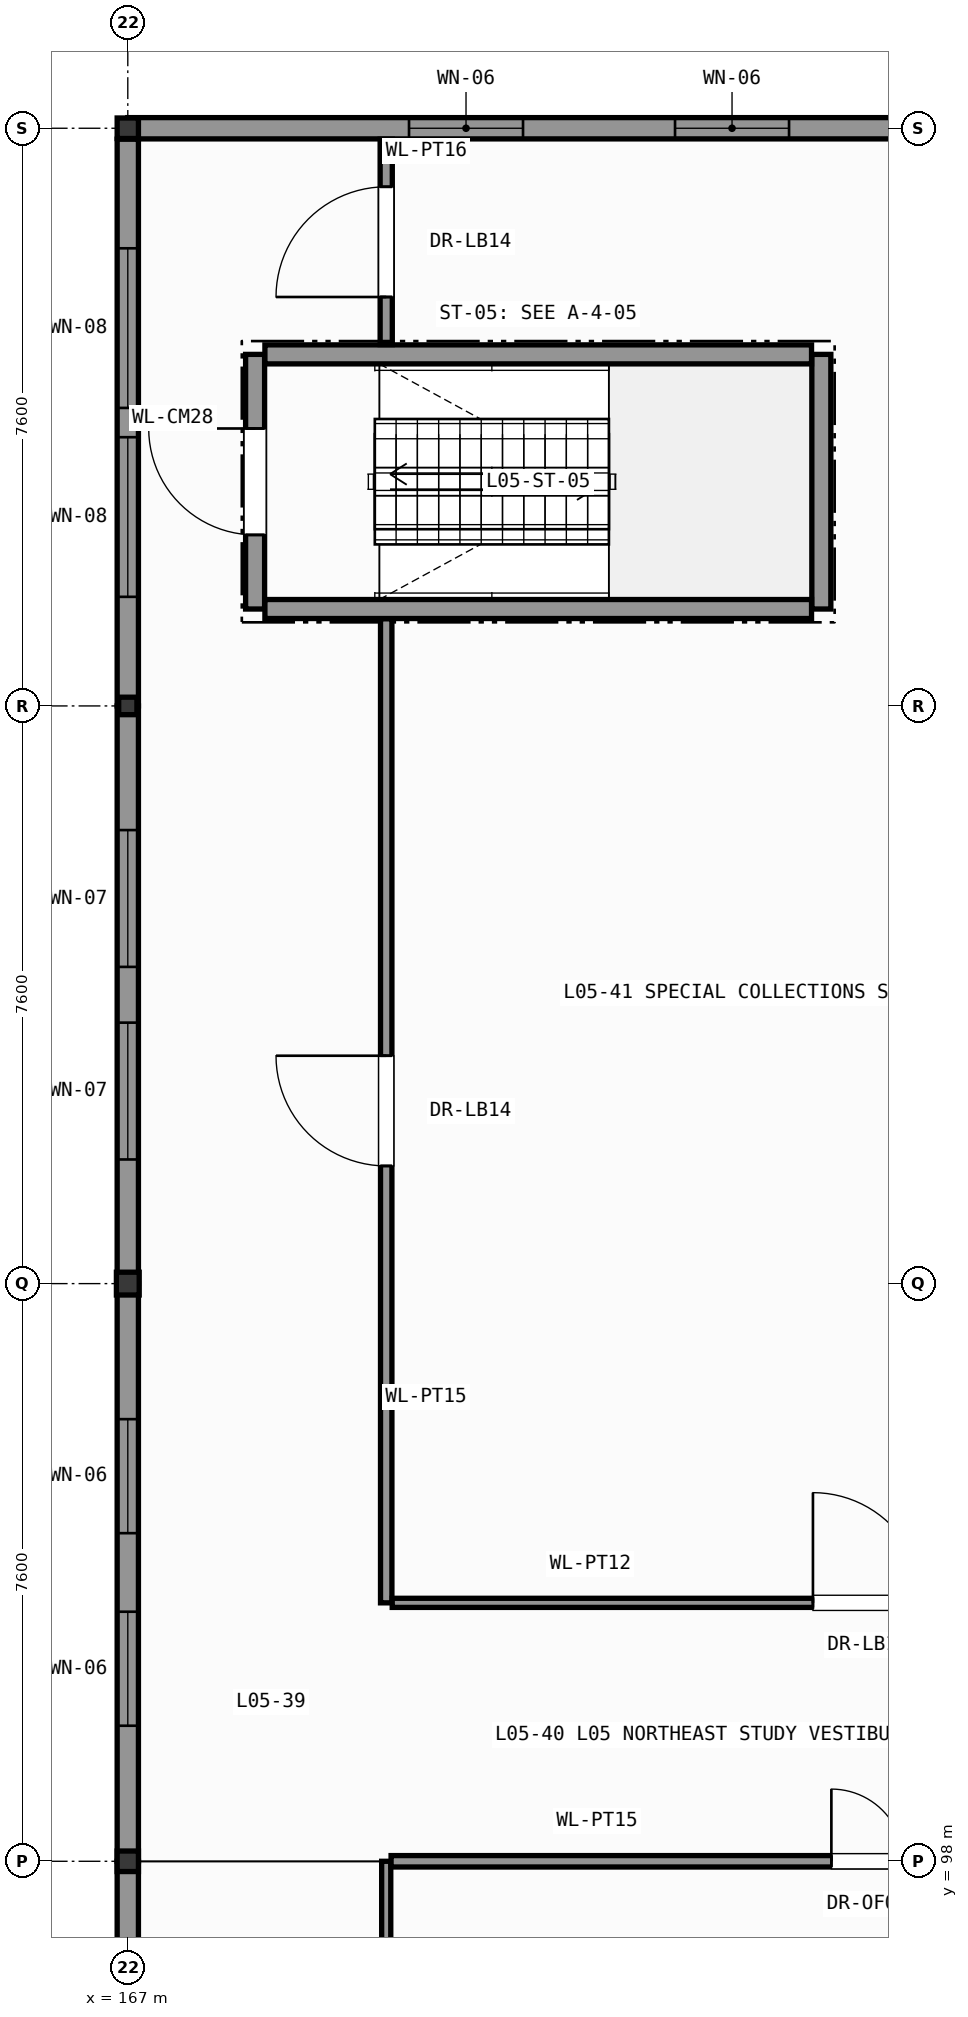
"""IFC4 building model, lengths in metres.
Left out: names, types, materials, properties, quantities, classifications, styles, units other than length and angle.
Written with IfcOpenShell. Run it as: python <this file> out.ifc"""

import sys

from ifc_helpers import new_model, si_unit, direction, frame, frame_2d, origin, origin_2d, place, context, subcontext, project, spatial, rectangle, i_section, extrude, element, fill, save


model = new_model("IFC4")
c1 = context("Model", 3, precision=1e-05, world=origin(), true_north=direction((0.0, 1.0)))
c2 = subcontext(c1, "Body", "Model", "MODEL_VIEW")
j1 = project(units=[si_unit("LENGTHUNIT", "METRE"), si_unit("PLANEANGLEUNIT", "RADIAN")], contexts=[c1])
p1 = place(None, origin())
s1 = spatial("IfcSite", under=j1, at=p1, CompositionType="ELEMENT")
p2 = place(p1, origin())
s2 = spatial("IfcBuilding", under=s1, at=p2, CompositionType="ELEMENT")
p3 = place(p2, frame((0.0, 0.0, 22.2)))
s3 = spatial("IfcBuildingStorey", under=s2, at=p3, CompositionType="ELEMENT", Elevation=22.2)
p4 = place(p3, frame((167.0, 98.0, 0.0), z_axis=(0.0, 0.0, 1.0), x_axis=(1.0, 0.0, 0.0)))
e1 = element("IfcColumn", 1, at=p4, inside=s3, PredefinedType="COLUMN", context=c2, shape_type="SweptSolid", body=[
    extrude(i_section(OverallWidth=0.28, OverallDepth=0.27, WebThickness=0.008, FlangeThickness=0.013, FilletRadius=0.024, at=origin_2d()), origin(), (0.0, 0.0, 1.0), 4.2),
])
p5 = place(p3, frame((167.0, 105.6, 0.0), z_axis=(0.0, 0.0, 1.0), x_axis=(1.0, 0.0, 0.0)))
e2 = element("IfcColumn", 2, at=p5, inside=s3, PredefinedType="COLUMN", context=c2, shape_type="SweptSolid", body=[
    extrude(i_section(OverallWidth=0.3, OverallDepth=0.3, WebThickness=0.011, FlangeThickness=0.019, FilletRadius=0.027, at=origin_2d()), origin(), (0.0, 0.0, 1.0), 4.2),
])
p6 = place(p3, frame((167.0, 113.2, 0.0), z_axis=(0.0, 0.0, 1.0), x_axis=(1.0, 0.0, 0.0)))
e3 = element("IfcColumn", 3, at=p6, inside=s3, PredefinedType="COLUMN", context=c2, shape_type="SweptSolid", body=[
    extrude(i_section(OverallWidth=0.24, OverallDepth=0.23, WebThickness=0.008, FlangeThickness=0.012, FilletRadius=0.021, at=origin_2d()), origin(), (0.0, 0.0, 1.0), 4.2),
])
p7 = place(p3, frame((167.0, 120.8, 0.0), z_axis=(0.0, 0.0, 1.0), x_axis=(1.0, 0.0, 0.0)))
e4 = element("IfcColumn", 4, at=p7, inside=s3, PredefinedType="COLUMN", context=c2, shape_type="SweptSolid", body=[
    extrude(i_section(OverallWidth=0.28, OverallDepth=0.27, WebThickness=0.008, FlangeThickness=0.013, FilletRadius=0.024, at=origin_2d()), origin(), (0.0, 0.0, 1.0), 4.2),
])
p8 = place(p3, frame((167.0, 120.8, 0.0), z_axis=(0.0, 0.0, 1.0), x_axis=(1.0, 0.0, 0.0)))
e5 = element("IfcWall", 5, at=p8, inside=s3, PredefinedType="SOLIDWALL", context=c2, shape_type="SweptSolid", body=[
    extrude(rectangle(XDim=12.0, YDim=0.28, at=frame_2d((6.0, 0.0))), origin(), (0.0, 0.0, 1.0), 3.415),
])
p9 = place(p8, frame((3.7, 0.0, 0.95)))
e6 = element("IfcOpeningElement", 6, at=p9, cuts=e5, PredefinedType="OPENING", context=c2, shape_type="SweptSolid", body=[
    extrude(rectangle(XDim=1.5, YDim=2.06, at=frame_2d((0.75, 1.03))), frame((0.0, 0.15, 0.0), z_axis=(0.0, -1.0, 0.0), x_axis=(1.0, 0.0, 0.0)), (0.0, 0.0, 1.0), 0.3),
])
p10 = place(p8, frame((7.2, 0.0, 0.95)))
e7 = element("IfcOpeningElement", 7, at=p10, cuts=e5, PredefinedType="OPENING", context=c2, shape_type="SweptSolid", body=[
    extrude(rectangle(XDim=1.5, YDim=2.06, at=frame_2d((0.75, 1.03))), frame((0.0, 0.15, 0.0), z_axis=(0.0, -1.0, 0.0), x_axis=(1.0, 0.0, 0.0)), (0.0, 0.0, 1.0), 0.3),
])
p11 = place(p3, frame((167.0, 113.2, 0.0), z_axis=(0.0, 0.0, 1.0), x_axis=(0.0, 1.0, 0.0)))
e8 = element("IfcWall", 8, at=p11, inside=s3, PredefinedType="SOLIDWALL", context=c2, shape_type="SweptSolid", body=[
    extrude(rectangle(XDim=7.456, YDim=0.28, at=frame_2d((3.728, 0.0))), origin(), (0.0, 0.0, 1.0), 3.675),
])
p12 = place(p11, frame((1.435, 0.0, 0.95)))
e9 = element("IfcOpeningElement", 9, at=p12, cuts=e8, PredefinedType="OPENING", context=c2, shape_type="SweptSolid", body=[
    extrude(rectangle(XDim=2.1, YDim=2.33, at=frame_2d((1.05, 1.165))), frame((0.0, 0.15, 0.0), z_axis=(0.0, -1.0, 0.0), x_axis=(1.0, 0.0, 0.0)), (0.0, 0.0, 1.0), 0.3),
])
p13 = place(p11, frame((3.921, 0.0, 0.95)))
e10 = element("IfcOpeningElement", 10, at=p13, cuts=e8, PredefinedType="OPENING", context=c2, shape_type="SweptSolid", body=[
    extrude(rectangle(XDim=2.1, YDim=2.33, at=frame_2d((1.05, 1.165))), frame((0.0, 0.15, 0.0), z_axis=(0.0, -1.0, 0.0), x_axis=(1.0, 0.0, 0.0)), (0.0, 0.0, 1.0), 0.3),
])
p14 = place(p3, frame((167.0, 105.6, 0.0), z_axis=(0.0, 0.0, 1.0), x_axis=(0.0, 1.0, 0.0)))
e11 = element("IfcWall", 11, at=p14, inside=s3, PredefinedType="SOLIDWALL", context=c2, shape_type="SweptSolid", body=[
    extrude(rectangle(XDim=7.6, YDim=0.28, at=frame_2d((3.8, 0.0))), origin(), (0.0, 0.0, 1.0), 3.675),
])
p15 = place(p14, frame((1.633, 0.0, 0.95)))
e12 = element("IfcOpeningElement", 12, at=p15, cuts=e11, PredefinedType="OPENING", context=c2, shape_type="SweptSolid", body=[
    extrude(rectangle(XDim=1.8, YDim=2.33, at=frame_2d((0.9, 1.165))), frame((0.0, 0.15, 0.0), z_axis=(0.0, -1.0, 0.0), x_axis=(1.0, 0.0, 0.0)), (0.0, 0.0, 1.0), 0.3),
])
p16 = place(p14, frame((4.167, 0.0, 0.95)))
e13 = element("IfcOpeningElement", 13, at=p16, cuts=e11, PredefinedType="OPENING", context=c2, shape_type="SweptSolid", body=[
    extrude(rectangle(XDim=1.8, YDim=2.33, at=frame_2d((0.9, 1.165))), frame((0.0, 0.15, 0.0), z_axis=(0.0, -1.0, 0.0), x_axis=(1.0, 0.0, 0.0)), (0.0, 0.0, 1.0), 0.3),
])
p17 = place(p3, frame((167.0, 98.0, 0.0), z_axis=(0.0, 0.0, 1.0), x_axis=(0.0, 1.0, 0.0)))
e14 = element("IfcWall", 14, at=p17, inside=s3, PredefinedType="SOLIDWALL", context=c2, shape_type="SweptSolid", body=[
    extrude(rectangle(XDim=7.6, YDim=0.28, at=frame_2d((3.8, 0.0))), origin(), (0.0, 0.0, 1.0), 3.675),
])
p18 = place(p17, frame((1.783, 0.0, 0.95)))
e15 = element("IfcOpeningElement", 15, at=p18, cuts=e14, PredefinedType="OPENING", context=c2, shape_type="SweptSolid", body=[
    extrude(rectangle(XDim=1.5, YDim=2.33, at=frame_2d((0.75, 1.165))), frame((0.0, 0.15, 0.0), z_axis=(0.0, -1.0, 0.0), x_axis=(1.0, 0.0, 0.0)), (0.0, 0.0, 1.0), 0.3),
])
p19 = place(p17, frame((4.317, 0.0, 0.95)))
e16 = element("IfcOpeningElement", 16, at=p19, cuts=e14, PredefinedType="OPENING", context=c2, shape_type="SweptSolid", body=[
    extrude(rectangle(XDim=1.5, YDim=2.33, at=frame_2d((0.75, 1.165))), frame((0.0, 0.15, 0.0), z_axis=(0.0, -1.0, 0.0), x_axis=(1.0, 0.0, 0.0)), (0.0, 0.0, 1.0), 0.3),
])
p20 = place(p3, frame((167.0, 90.4, 0.0), z_axis=(0.0, 0.0, 1.0), x_axis=(0.0, 1.0, 0.0)))
e17 = element("IfcWall", 17, at=p20, inside=s3, PredefinedType="SOLIDWALL", context=c2, shape_type="SweptSolid", body=[
    extrude(rectangle(XDim=7.6, YDim=0.28, at=frame_2d((3.8, 0.0))), origin(), (0.0, 0.0, 1.0), 3.675),
])
p21 = place(p20, frame((1.483, 0.0, 0.95)))
e18 = element("IfcOpeningElement", 18, at=p21, cuts=e17, PredefinedType="OPENING", context=c2, shape_type="SweptSolid", body=[
    extrude(rectangle(XDim=2.1, YDim=2.33, at=frame_2d((1.05, 1.165))), frame((0.0, 0.15, 0.0), z_axis=(0.0, -1.0, 0.0), x_axis=(1.0, 0.0, 0.0)), (0.0, 0.0, 1.0), 0.3),
])
p22 = place(p20, frame((4.017, 0.0, 0.95)))
e19 = element("IfcOpeningElement", 19, at=p22, cuts=e17, PredefinedType="OPENING", context=c2, shape_type="SweptSolid", body=[
    extrude(rectangle(XDim=2.1, YDim=2.33, at=frame_2d((1.05, 1.165))), frame((0.0, 0.15, 0.0), z_axis=(0.0, -1.0, 0.0), x_axis=(1.0, 0.0, 0.0)), (0.0, 0.0, 1.0), 0.3),
])
p23 = place(p3, frame((168.675, 114.475, 0.0), z_axis=(0.0, 0.0, 1.0), x_axis=(0.0, 1.0, 0.0)))
e20 = element("IfcWall", 20, at=p23, inside=s3, PredefinedType="SHEAR", context=c2, shape_type="SweptSolid", body=[
    extrude(rectangle(XDim=3.35, YDim=0.25, at=frame_2d((1.675, 0.0))), origin(), (0.0, 0.0, 1.0), 3.98),
])
p24 = place(p23, frame((0.975, 0.0, 0.0)))
e21 = element("IfcOpeningElement", 21, at=p24, cuts=e20, PredefinedType="OPENING", context=c2, shape_type="SweptSolid", body=[
    extrude(rectangle(XDim=1.4, YDim=2.2, at=frame_2d((0.7, 1.1))), frame((0.0, 0.135, 0.0), z_axis=(0.0, -1.0, 0.0), x_axis=(1.0, 0.0, 0.0)), (0.0, 0.0, 1.0), 0.27),
])
p25 = place(p3, frame((176.125, 114.475, 0.0), z_axis=(0.0, 0.0, 1.0), x_axis=(0.0, 1.0, 0.0)))
e22 = element("IfcWall", 22, at=p25, inside=s3, PredefinedType="SHEAR", context=c2, shape_type="SweptSolid", body=[
    extrude(rectangle(XDim=3.35, YDim=0.25, at=frame_2d((1.675, 0.0))), origin(), (0.0, 0.0, 1.0), 3.98),
])
for number, where, z_axis, x_axis in (
    (23, (168.804, 114.475, 0.0), (0.0, 0.0, 1.0), (1.0, 0.0, 0.0)),
    (24, (168.804, 117.825, 0.0), (0.0, 0.0, 1.0), (1.0, 0.0, 0.0)),
):
    element("IfcWall", number, at=place(p3, frame(where, z_axis=z_axis, x_axis=x_axis)), inside=s3, PredefinedType="SHEAR", context=c2, shape_type="SweptSolid", body=[
        extrude(rectangle(XDim=7.192, YDim=0.25, at=frame_2d((3.596, 0.0))), origin(), (0.0, 0.0, 1.0), 3.98),
    ])
p26 = place(p3, frame((170.4, 86.879, 0.0), z_axis=(0.0, 0.0, 1.0), x_axis=(0.0, 1.0, 0.0)))
e25 = element("IfcWall", 25, at=p26, inside=s3, PredefinedType="PARTITIONING", context=c2, shape_type="SweptSolid", body=[
    extrude(rectangle(XDim=11.121, YDim=0.12, at=frame_2d((5.561, 0.0))), origin(), (0.0, 0.0, 1.0), 3.98),
])
p27 = place(p26, frame((5.035, 0.0, 0.0)))
e26 = element("IfcOpeningElement", 26, at=p27, cuts=e25, PredefinedType="OPENING", context=c2, shape_type="SweptSolid", body=[
    extrude(rectangle(XDim=1.05, YDim=2.2, at=frame_2d((0.525, 1.1))), frame((0.0, 0.07, 0.0), z_axis=(0.0, -1.0, 0.0), x_axis=(1.0, 0.0, 0.0)), (0.0, 0.0, 1.0), 0.14),
])
p28 = place(p3, frame((170.464, 98.0, 0.0), z_axis=(0.0, 0.0, 1.0), x_axis=(1.0, 0.0, 0.0)))
e27 = element("IfcWall", 27, at=p28, inside=s3, PredefinedType="PARTITIONING", context=c2, shape_type="SweptSolid", body=[
    extrude(rectangle(XDim=12.536, YDim=0.15, at=frame_2d((6.268, 0.0))), origin(), (0.0, 0.0, 1.0), 3.415),
])
p29 = place(p28, frame((5.793, 0.0, 0.0)))
e28 = element("IfcOpeningElement", 28, at=p29, cuts=e27, PredefinedType="OPENING", context=c2, shape_type="SweptSolid", body=[
    extrude(rectangle(XDim=0.95, YDim=2.1, at=frame_2d((0.475, 1.05))), frame((0.0, 0.085, 0.0), z_axis=(0.0, -1.0, 0.0), x_axis=(1.0, 0.0, 0.0)), (0.0, 0.0, 1.0), 0.17),
])
p30 = place(p3, frame((170.4, 117.954, 0.0), z_axis=(0.0, 0.0, 1.0), x_axis=(0.0, 1.0, 0.0)))
e29 = element("IfcWall", 29, at=p30, inside=s3, PredefinedType="PARTITIONING", context=c2, shape_type="SweptSolid", body=[
    extrude(rectangle(XDim=2.702, YDim=0.16, at=frame_2d((1.351, 0.0))), origin(), (0.0, 0.0, 1.0), 3.98),
])
p31 = place(p30, frame((0.626, 0.0, 0.0)))
e30 = element("IfcOpeningElement", 30, at=p31, cuts=e29, PredefinedType="OPENING", context=c2, shape_type="SweptSolid", body=[
    extrude(rectangle(XDim=1.45, YDim=2.35, at=frame_2d((0.725, 1.175))), frame((0.0, 0.09, 0.0), z_axis=(0.0, -1.0, 0.0), x_axis=(1.0, 0.0, 0.0)), (0.0, 0.0, 1.0), 0.18),
])
p32 = place(p3, frame((170.4, 101.4, 0.0), z_axis=(0.0, 0.0, 1.0), x_axis=(0.0, 1.0, 0.0)))
e31 = element("IfcWall", 31, at=p32, inside=s3, PredefinedType="PARTITIONING", context=c2, shape_type="SweptSolid", body=[
    extrude(rectangle(XDim=12.946, YDim=0.15, at=frame_2d((6.473, 0.0))), origin(), (0.0, 0.0, 1.0), 3.98),
])
p33 = place(p32, frame((5.748, 0.0, 0.0)))
e32 = element("IfcOpeningElement", 32, at=p33, cuts=e31, PredefinedType="OPENING", context=c2, shape_type="SweptSolid", body=[
    extrude(rectangle(XDim=1.45, YDim=2.35, at=frame_2d((0.725, 1.175))), frame((0.0, 0.085, 0.0), z_axis=(0.0, -1.0, 0.0), x_axis=(1.0, 0.0, 0.0)), (0.0, 0.0, 1.0), 0.17),
])
p34 = place(p3, frame((170.479, 101.4, 0.0), z_axis=(0.0, 0.0, 1.0), x_axis=(1.0, 0.0, 0.0)))
e33 = element("IfcWall", 33, at=p34, inside=s3, PredefinedType="PARTITIONING", context=c2, shape_type="SweptSolid", body=[
    extrude(rectangle(XDim=12.521, YDim=0.12, at=frame_2d((6.26, 0.0))), origin(), (0.0, 0.0, 1.0), 3.98),
])
p35 = place(p34, frame((5.535, 0.0, 0.0)))
e34 = element("IfcOpeningElement", 34, at=p35, cuts=e33, PredefinedType="OPENING", context=c2, shape_type="SweptSolid", body=[
    extrude(rectangle(XDim=1.45, YDim=2.35, at=frame_2d((0.725, 1.175))), frame((0.0, 0.07, 0.0), z_axis=(0.0, -1.0, 0.0), x_axis=(1.0, 0.0, 0.0)), (0.0, 0.0, 1.0), 0.14),
])
p36 = place(p9, origin())
e35 = element("IfcWindow", 35, at=p36, inside=s3, PartitioningType="SINGLE_PANEL", PredefinedType="WINDOW", context=c2, shape_type="SweptSolid", body=[
    extrude(rectangle(XDim=1.5, YDim=2.06, at=frame_2d((0.75, 1.03))), frame((0.0, 0.03, 0.0), z_axis=(0.0, -1.0, 0.0), x_axis=(1.0, 0.0, 0.0)), (0.0, 0.0, 1.0), 0.06),
])
fill(e6, e35)
p37 = place(p10, origin())
e36 = element("IfcWindow", 36, at=p37, inside=s3, PartitioningType="SINGLE_PANEL", PredefinedType="WINDOW", context=c2, shape_type="SweptSolid", body=[
    extrude(rectangle(XDim=1.5, YDim=2.06, at=frame_2d((0.75, 1.03))), frame((0.0, 0.03, 0.0), z_axis=(0.0, -1.0, 0.0), x_axis=(1.0, 0.0, 0.0)), (0.0, 0.0, 1.0), 0.06),
])
fill(e7, e36)
p38 = place(p12, origin())
e37 = element("IfcWindow", 37, at=p38, inside=s3, PartitioningType="SINGLE_PANEL", PredefinedType="WINDOW", context=c2, shape_type="SweptSolid", body=[
    extrude(rectangle(XDim=2.1, YDim=2.33, at=frame_2d((1.05, 1.165))), frame((0.0, 0.03, 0.0), z_axis=(0.0, -1.0, 0.0), x_axis=(1.0, 0.0, 0.0)), (0.0, 0.0, 1.0), 0.06),
])
fill(e9, e37)
p39 = place(p13, origin())
e38 = element("IfcWindow", 38, at=p39, inside=s3, PartitioningType="SINGLE_PANEL", PredefinedType="WINDOW", context=c2, shape_type="SweptSolid", body=[
    extrude(rectangle(XDim=2.1, YDim=2.33, at=frame_2d((1.05, 1.165))), frame((0.0, 0.03, 0.0), z_axis=(0.0, -1.0, 0.0), x_axis=(1.0, 0.0, 0.0)), (0.0, 0.0, 1.0), 0.06),
])
fill(e10, e38)
p40 = place(p15, origin())
e39 = element("IfcWindow", 39, at=p40, inside=s3, PartitioningType="SINGLE_PANEL", PredefinedType="WINDOW", context=c2, shape_type="SweptSolid", body=[
    extrude(rectangle(XDim=1.8, YDim=2.33, at=frame_2d((0.9, 1.165))), frame((0.0, 0.03, 0.0), z_axis=(0.0, -1.0, 0.0), x_axis=(1.0, 0.0, 0.0)), (0.0, 0.0, 1.0), 0.06),
])
fill(e12, e39)
p41 = place(p16, origin())
e40 = element("IfcWindow", 40, at=p41, inside=s3, PartitioningType="SINGLE_PANEL", PredefinedType="WINDOW", context=c2, shape_type="SweptSolid", body=[
    extrude(rectangle(XDim=1.8, YDim=2.33, at=frame_2d((0.9, 1.165))), frame((0.0, 0.03, 0.0), z_axis=(0.0, -1.0, 0.0), x_axis=(1.0, 0.0, 0.0)), (0.0, 0.0, 1.0), 0.06),
])
fill(e13, e40)
p42 = place(p18, origin())
e41 = element("IfcWindow", 41, at=p42, inside=s3, PartitioningType="SINGLE_PANEL", PredefinedType="WINDOW", context=c2, shape_type="SweptSolid", body=[
    extrude(rectangle(XDim=1.5, YDim=2.33, at=frame_2d((0.75, 1.165))), frame((0.0, 0.03, 0.0), z_axis=(0.0, -1.0, 0.0), x_axis=(1.0, 0.0, 0.0)), (0.0, 0.0, 1.0), 0.06),
])
fill(e15, e41)
p43 = place(p19, origin())
e42 = element("IfcWindow", 42, at=p43, inside=s3, PartitioningType="SINGLE_PANEL", PredefinedType="WINDOW", context=c2, shape_type="SweptSolid", body=[
    extrude(rectangle(XDim=1.5, YDim=2.33, at=frame_2d((0.75, 1.165))), frame((0.0, 0.03, 0.0), z_axis=(0.0, -1.0, 0.0), x_axis=(1.0, 0.0, 0.0)), (0.0, 0.0, 1.0), 0.06),
])
fill(e16, e42)
p44 = place(p24, origin())
e43 = element("IfcDoor", 43, at=p44, inside=s3, OperationType="SINGLE_SWING_RIGHT", PredefinedType="DOOR", context=c2, shape_type="SweptSolid", body=[
    extrude(rectangle(XDim=1.4, YDim=2.2, at=frame_2d((0.7, 1.1))), frame((0.0, 0.025, 0.0), z_axis=(0.0, -1.0, 0.0), x_axis=(1.0, 0.0, 0.0)), (0.0, 0.0, 1.0), 0.05),
])
fill(e21, e43)
p45 = place(p29, origin())
e44 = element("IfcDoor", 44, at=p45, inside=s3, OperationType="SINGLE_SWING_LEFT", PredefinedType="DOOR", context=c2, shape_type="SweptSolid", body=[
    extrude(rectangle(XDim=0.95, YDim=2.1, at=frame_2d((0.475, 1.05))), frame((0.0, 0.025, 0.0), z_axis=(0.0, -1.0, 0.0), x_axis=(1.0, 0.0, 0.0)), (0.0, 0.0, 1.0), 0.05),
])
fill(e28, e44)
p46 = place(p31, origin())
e45 = element("IfcDoor", 45, at=p46, inside=s3, OperationType="SINGLE_SWING_LEFT", PredefinedType="DOOR", context=c2, shape_type="SweptSolid", body=[
    extrude(rectangle(XDim=1.45, YDim=2.35, at=frame_2d((0.725, 1.175))), frame((0.0, 0.025, 0.0), z_axis=(0.0, -1.0, 0.0), x_axis=(1.0, 0.0, 0.0)), (0.0, 0.0, 1.0), 0.05),
])
fill(e30, e45)
p47 = place(p33, origin())
e46 = element("IfcDoor", 46, at=p47, inside=s3, OperationType="SINGLE_SWING_RIGHT", PredefinedType="DOOR", context=c2, shape_type="SweptSolid", body=[
    extrude(rectangle(XDim=1.45, YDim=2.35, at=frame_2d((0.725, 1.175))), frame((0.0, 0.025, 0.0), z_axis=(0.0, -1.0, 0.0), x_axis=(1.0, 0.0, 0.0)), (0.0, 0.0, 1.0), 0.05),
])
fill(e32, e46)
p48 = place(p35, origin())
e47 = element("IfcDoor", 47, at=p48, inside=s3, OperationType="SINGLE_SWING_LEFT", PredefinedType="DOOR", context=c2, shape_type="SweptSolid", body=[
    extrude(rectangle(XDim=1.45, YDim=2.35, at=frame_2d((0.725, 1.175))), frame((0.0, 0.025, 0.0), z_axis=(0.0, -1.0, 0.0), x_axis=(1.0, 0.0, 0.0)), (0.0, 0.0, 1.0), 0.05),
])
fill(e34, e47)
save(model, sys.argv[1])
